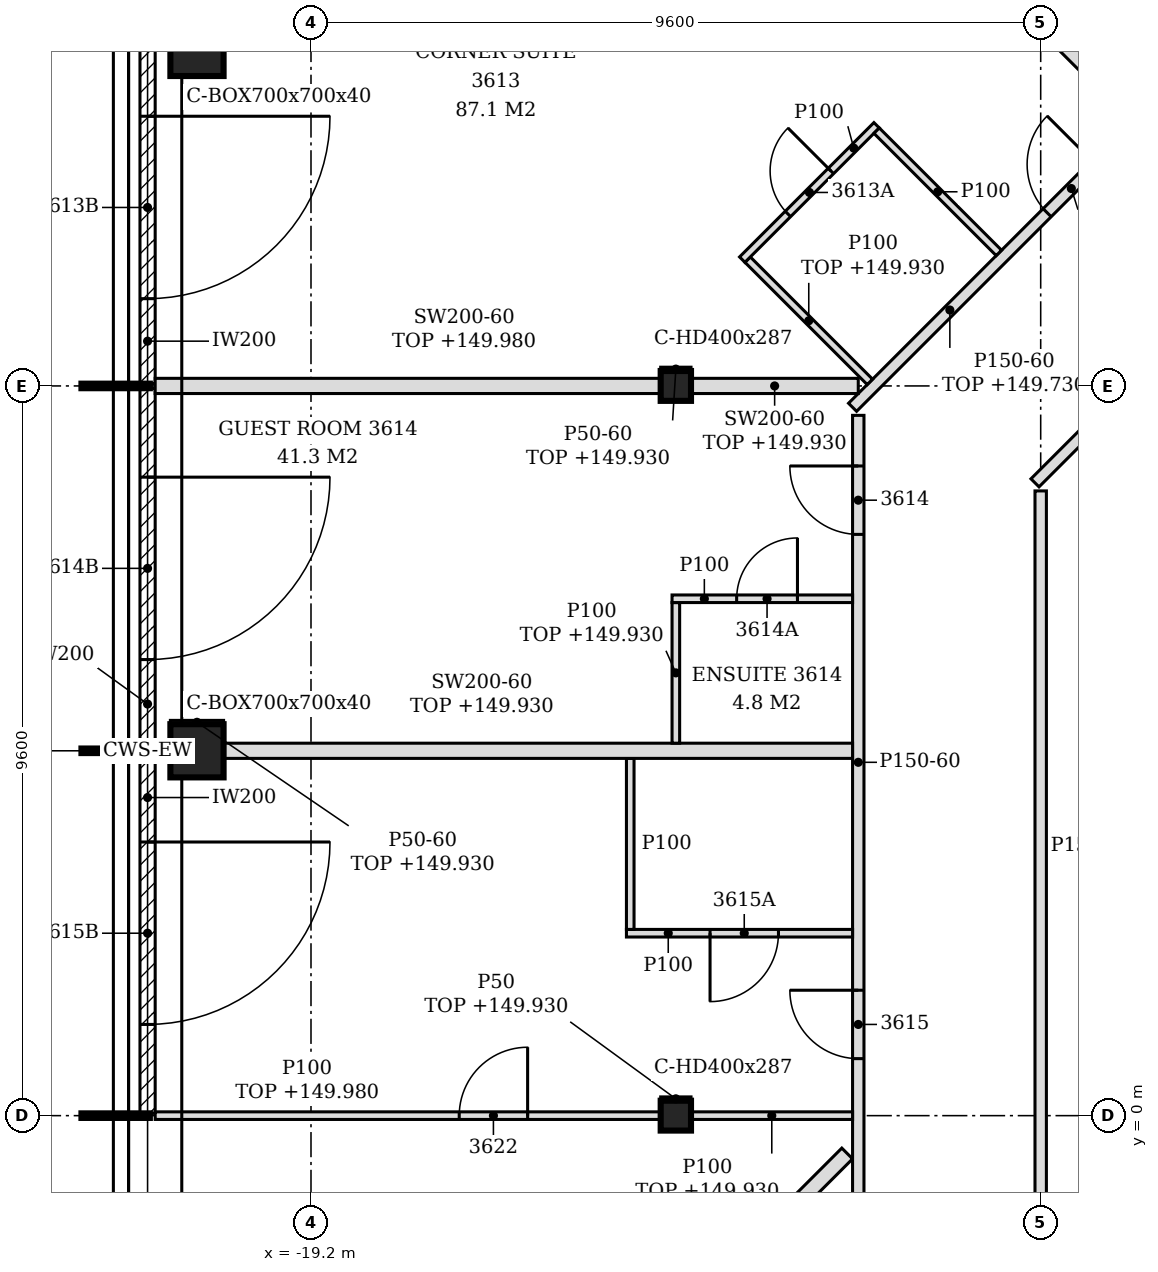
"""IFC4 building model, lengths in metres.
Left out: names, types, materials, properties, quantities, classifications, styles, units other than length and angle.
Written with IfcOpenShell. Run it as: python <this file> out.ifc"""

import sys

from ifc_helpers import new_model, si_unit, direction, frame, frame_2d, origin, origin_2d, place, context, subcontext, project, spatial, polyline, rectangle, hollow_rectangle, i_section, outline, extrude, element, fill, save


model = new_model("IFC4")
c1 = context("Model", 3, precision=1e-05, world=origin(), true_north=direction((0.0, 1.0)))
c2 = subcontext(c1, "Body", "Model", "MODEL_VIEW")
j1 = project(units=[si_unit("LENGTHUNIT", "METRE"), si_unit("PLANEANGLEUNIT", "RADIAN")], contexts=[c1])
p1 = place(None, origin())
s1 = spatial("IfcSite", under=j1, at=p1, CompositionType="ELEMENT")
p2 = place(p1, origin())
s2 = spatial("IfcBuilding", under=s1, at=p2, CompositionType="ELEMENT")
p3 = place(p2, frame((0.0, 0.0, 147.0)))
s3 = spatial("IfcBuildingStorey", under=s2, at=p3, CompositionType="ELEMENT", Elevation=147.0)
for number, where, z_axis, x_axis in (
    (1, (-20.7, 14.027, -0.15), (0.0, 0.0, 1.0), (1.0, 0.0, 0.0)),
    (2, (-20.7, 4.8, -0.15), (0.0, 0.0, 1.0), (1.0, 0.0, 0.0)),
):
    element("IfcColumn", number, at=place(p3, frame(where, z_axis=z_axis, x_axis=x_axis)), inside=s3, PredefinedType="COLUMN", context=c2, shape_type="SweptSolid", body=[
        extrude(hollow_rectangle(XDim=0.7, YDim=0.7, WallThickness=0.04, at=origin_2d()), origin(), (0.0, 0.0, 1.0), 3.6),
    ])
for number, where, z_axis, x_axis in (
    (3, (-14.4, 0.0, -0.15), (0.0, 0.0, 1.0), (1.0, 0.0, 0.0)),
    (4, (-14.4, 9.6, -0.15), (0.0, 0.0, 1.0), (1.0, 0.0, 0.0)),
):
    element("IfcColumn", number, at=place(p3, frame(where, z_axis=z_axis, x_axis=x_axis)), inside=s3, PredefinedType="COLUMN", context=c2, shape_type="SweptSolid", body=[
        extrude(i_section(OverallWidth=0.399, OverallDepth=0.393, WebThickness=0.023, FlangeThickness=0.037, FilletRadius=0.015, at=origin_2d()), origin(), (0.0, 0.0, 1.0), 3.6),
    ])
p4 = place(p3, frame((-21.35, 14.256, 0.0), z_axis=(0.0, 0.0, 1.0), x_axis=(0.0, -1.0, 0.0)))
e5 = element("IfcWall", 5, at=p4, inside=s3, PredefinedType="NOTDEFINED", context=c2, shape_type="SweptSolid", body=[
    extrude(rectangle(XDim=4.626, YDim=0.2, at=frame_2d((2.313, 0.0))), origin(), (0.0, 0.0, 1.0), 3.45),
])
p5 = place(p4, frame((1.108, 0.0, 0.0)))
e6 = element("IfcOpeningElement", 6, at=p5, cuts=e5, PredefinedType="OPENING", context=c2, shape_type="SweptSolid", body=[
    extrude(rectangle(XDim=2.4, YDim=2.4, at=frame_2d((1.2, 1.2))), frame((0.0, 0.11, 0.0), z_axis=(0.0, -1.0, 0.0), x_axis=(1.0, 0.0, 0.0)), (0.0, 0.0, 1.0), 0.22),
])
p6 = place(p3, frame((-21.35, 9.57, 0.0), z_axis=(0.0, 0.0, 1.0), x_axis=(0.0, -1.0, 0.0)))
e7 = element("IfcWall", 7, at=p6, inside=s3, PredefinedType="NOTDEFINED", context=c2, shape_type="SweptSolid", body=[
    extrude(rectangle(XDim=4.74, YDim=0.2, at=frame_2d((2.37, 0.0))), origin(), (0.0, 0.0, 1.0), 3.45),
])
p7 = place(p6, frame((1.17, 0.0, 0.0)))
e8 = element("IfcOpeningElement", 8, at=p7, cuts=e7, PredefinedType="OPENING", context=c2, shape_type="SweptSolid", body=[
    extrude(rectangle(XDim=2.4, YDim=2.4, at=frame_2d((1.2, 1.2))), frame((0.0, 0.11, 0.0), z_axis=(0.0, -1.0, 0.0), x_axis=(1.0, 0.0, 0.0)), (0.0, 0.0, 1.0), 0.22),
])
p8 = place(p3, frame((-21.35, 4.77, 0.0), z_axis=(0.0, 0.0, 1.0), x_axis=(0.0, -1.0, 0.0)))
e9 = element("IfcWall", 9, at=p8, inside=s3, PredefinedType="NOTDEFINED", context=c2, shape_type="SweptSolid", body=[
    extrude(rectangle(XDim=4.74, YDim=0.2, at=frame_2d((2.37, 0.0))), origin(), (0.0, 0.0, 1.0), 3.45),
])
p9 = place(p8, frame((1.17, 0.0, 0.0)))
e10 = element("IfcOpeningElement", 10, at=p9, cuts=e9, PredefinedType="OPENING", context=c2, shape_type="SweptSolid", body=[
    extrude(rectangle(XDim=2.4, YDim=2.4, at=frame_2d((1.2, 1.2))), frame((0.0, 0.11, 0.0), z_axis=(0.0, -1.0, 0.0), x_axis=(1.0, 0.0, 0.0)), (0.0, 0.0, 1.0), 0.22),
])
p10 = place(p3, frame((-18.755, -7.107, 0.0), z_axis=(0.0, 0.0, 1.0), x_axis=(0.707106781187, 0.707106781187, 0.0)))
e11 = element("IfcWall", 11, at=p10, inside=s3, PredefinedType="PARTITIONING", context=c2, shape_type="SweptSolid", body=[
    extrude(rectangle(XDim=9.347, YDim=0.2, at=frame_2d((4.674, 0.0))), origin(), (0.0, 0.0, 1.0), 2.93),
])
p11 = place(p3, frame((-12.0, -4.7, 0.0), z_axis=(0.0, 0.0, 1.0), x_axis=(0.0, 1.0, 0.0)))
e12 = element("IfcWall", 12, at=p11, inside=s3, PredefinedType="PARTITIONING", context=c2, shape_type="SweptSolid", body=[
    extrude(outline(polyline([(0.0, 0.0), (13.913, 0.0), (13.913, 3.45), (9.6, 3.45), (9.598, 2.93), (9.4, 2.93), (9.398, 3.45), (4.8, 3.45), (4.798, 2.93), (4.6, 2.93), (4.598, 3.45), (0.0, 3.45), (0.0, 0.0)])), frame((0.0, 0.075, 0.0), z_axis=(0.0, -1.0, 0.0), x_axis=(1.0, 0.0, 0.0)), (0.0, 0.0, 1.0), 0.15),
])
p12 = place(p11, frame((12.347, 0.0, 0.0)))
e13 = element("IfcOpeningElement", 13, at=p12, cuts=e12, PredefinedType="OPENING", context=c2, shape_type="SweptSolid", body=[
    extrude(rectangle(XDim=0.9, YDim=2.1, at=frame_2d((0.45, 1.05))), frame((0.0, 0.085, 0.0), z_axis=(0.0, -1.0, 0.0), x_axis=(1.0, 0.0, 0.0)), (0.0, 0.0, 1.0), 0.17),
])
p13 = place(p11, frame((5.45, 0.0, 0.0)))
e14 = element("IfcOpeningElement", 14, at=p13, cuts=e12, PredefinedType="OPENING", context=c2, shape_type="SweptSolid", body=[
    extrude(rectangle(XDim=0.9, YDim=2.1, at=frame_2d((0.45, 1.05))), frame((0.0, 0.085, 0.0), z_axis=(0.0, -1.0, 0.0), x_axis=(1.0, 0.0, 0.0)), (0.0, 0.0, 1.0), 0.17),
])
p14 = place(p11, frame((1.777, 0.0, 0.0)))
e15 = element("IfcOpeningElement", 15, at=p14, cuts=e12, PredefinedType="OPENING", context=c2, shape_type="SweptSolid", body=[
    extrude(rectangle(XDim=0.9, YDim=2.1, at=frame_2d((0.45, 1.05))), frame((0.0, 0.085, 0.0), z_axis=(0.0, -1.0, 0.0), x_axis=(1.0, 0.0, 0.0)), (0.0, 0.0, 1.0), 0.17),
])
p15 = place(p3, frame((-9.6, -1.125, 0.0), z_axis=(0.0, 0.0, 1.0), x_axis=(0.0, 1.0, 0.0)))
e16 = element("IfcWall", 16, at=p15, inside=s3, PredefinedType="PARTITIONING", context=c2, shape_type="SweptSolid", body=[
    extrude(outline(polyline([(0.0, 0.0), (9.344, 0.0), (9.344, 3.45), (6.025, 3.45), (6.023, 2.93), (5.825, 2.93), (5.823, 3.45), (1.225, 3.45), (1.223, 2.93), (1.025, 2.93), (1.023, 3.45), (0.0, 3.45), (0.0, 0.0)])), frame((0.0, 0.075, 0.0), z_axis=(0.0, -1.0, 0.0), x_axis=(1.0, 0.0, 0.0)), (0.0, 0.0, 1.0), 0.15),
])
p16 = place(p3, frame((-21.25, 0.0, 0.0), z_axis=(0.0, 0.0, 1.0), x_axis=(1.0, 0.0, 0.0)))
e17 = element("IfcWall", 17, at=p16, inside=s3, PredefinedType="PARTITIONING", context=c2, shape_type="SweptSolid", body=[
    extrude(outline(polyline([(0.0, 0.0), (6.65, 0.0), (6.65, 2.98), (0.7, 2.98), (0.698, 2.93), (0.4, 2.93), (0.398, 2.98), (0.0, 2.98), (0.0, 0.0)])), frame((0.0, 0.05, 0.0), z_axis=(0.0, -1.0, 0.0), x_axis=(1.0, 0.0, 0.0)), (0.0, 0.0, 1.0), 0.1),
])
p17 = place(p16, frame((4.0, 0.0, 0.0)))
e18 = element("IfcOpeningElement", 18, at=p17, cuts=e17, PredefinedType="OPENING", context=c2, shape_type="SweptSolid", body=[
    extrude(rectangle(XDim=0.9, YDim=2.1, at=frame_2d((0.45, 1.05))), frame((0.0, 0.06, 0.0), z_axis=(0.0, -1.0, 0.0), x_axis=(1.0, 0.0, 0.0)), (0.0, 0.0, 1.0), 0.12),
])
p18 = place(p3, frame((-14.2, 0.0, 0.0), z_axis=(0.0, 0.0, 1.0), x_axis=(1.0, 0.0, 0.0)))
e19 = element("IfcWall", 19, at=p18, inside=s3, PredefinedType="PARTITIONING", context=c2, shape_type="SweptSolid", body=[
    extrude(rectangle(XDim=2.125, YDim=0.1, at=frame_2d((1.063, 0.0))), origin(), (0.0, 0.0, 1.0), 2.93),
])
p19 = place(p3, frame((-15.05, 2.4, 0.0), z_axis=(0.0, 0.0, 1.0), x_axis=(1.0, 0.0, 0.0)))
e20 = element("IfcWall", 20, at=p19, inside=s3, PredefinedType="PARTITIONING", context=c2, shape_type="SweptSolid", body=[
    extrude(outline(polyline([(0.0, 0.0), (2.975, 0.0), (2.975, 3.45), (0.8, 3.45), (0.798, 2.93), (0.5, 2.93), (0.498, 3.45), (0.0, 3.45), (0.0, 0.0)])), frame((0.0, 0.05, 0.0), z_axis=(0.0, -1.0, 0.0), x_axis=(1.0, 0.0, 0.0)), (0.0, 0.0, 1.0), 0.1),
])
p20 = place(p19, frame((1.1, 0.0, 0.0)))
e21 = element("IfcOpeningElement", 21, at=p20, cuts=e20, PredefinedType="OPENING", context=c2, shape_type="SweptSolid", body=[
    extrude(rectangle(XDim=0.9, YDim=2.1, at=frame_2d((0.45, 1.05))), frame((0.0, 0.06, 0.0), z_axis=(0.0, -1.0, 0.0), x_axis=(1.0, 0.0, 0.0)), (0.0, 0.0, 1.0), 0.12),
])
p21 = place(p3, frame((-15.0, 2.45, 0.0), z_axis=(0.0, 0.0, 1.0), x_axis=(0.0, 1.0, 0.0)))
e22 = element("IfcWall", 22, at=p21, inside=s3, PredefinedType="PARTITIONING", context=c2, shape_type="SweptSolid", body=[
    extrude(rectangle(XDim=2.25, YDim=0.1, at=frame_2d((1.125, 0.0))), origin(), (0.0, 0.0, 1.0), 3.45),
])
p22 = place(p3, frame((-21.25, 4.8, 0.0), z_axis=(0.0, 0.0, 1.0), x_axis=(1.0, 0.0, 0.0)))
e23 = element("IfcWall", 23, at=p22, inside=s3, PredefinedType="PARTITIONING", context=c2, shape_type="SweptSolid", body=[
    extrude(rectangle(XDim=0.2, YDim=0.2, at=frame_2d((0.1, 0.0))), origin(), (0.0, 0.0, 1.0), 3.45),
])
p23 = place(p3, frame((-20.35, 4.8, 0.0), z_axis=(0.0, 0.0, 1.0), x_axis=(1.0, 0.0, 0.0)))
e24 = element("IfcWall", 24, at=p23, inside=s3, PredefinedType="PARTITIONING", context=c2, shape_type="SweptSolid", body=[
    extrude(rectangle(XDim=8.275, YDim=0.2, at=frame_2d((4.138, 0.0))), origin(), (0.0, 0.0, 1.0), 2.93),
])
p24 = place(p3, frame((-14.4, 4.9, 0.0), z_axis=(0.0, 0.0, 1.0), x_axis=(0.0, 1.0, 0.0)))
e25 = element("IfcWall", 25, at=p24, inside=s3, PredefinedType="PARTITIONING", context=c2, shape_type="SweptSolid", body=[
    extrude(rectangle(XDim=1.85, YDim=0.1, at=frame_2d((0.925, 0.0))), origin(), (0.0, 0.0, 1.0), 2.93),
])
p25 = place(p3, frame((-14.45, 6.8, 0.0), z_axis=(0.0, 0.0, 1.0), x_axis=(1.0, 0.0, 0.0)))
e26 = element("IfcWall", 26, at=p25, inside=s3, PredefinedType="PARTITIONING", context=c2, shape_type="SweptSolid", body=[
    extrude(outline(polyline([(0.0, 0.0), (2.375, 0.0), (2.375, 3.45), (0.2, 3.45), (0.198, 2.93), (0.0, 2.93), (0.0, 0.0)])), frame((0.0, 0.05, 0.0), z_axis=(0.0, -1.0, 0.0), x_axis=(1.0, 0.0, 0.0)), (0.0, 0.0, 1.0), 0.1),
])
p26 = place(p25, frame((0.85, 0.0, 0.0)))
e27 = element("IfcOpeningElement", 27, at=p26, cuts=e26, PredefinedType="OPENING", context=c2, shape_type="SweptSolid", body=[
    extrude(rectangle(XDim=0.8, YDim=2.1, at=frame_2d((0.4, 1.05))), frame((0.0, 0.06, 0.0), z_axis=(0.0, -1.0, 0.0), x_axis=(1.0, 0.0, 0.0)), (0.0, 0.0, 1.0), 0.12),
])
p27 = place(p3, frame((-9.675, 8.325, 0.0), z_axis=(0.0, 0.0, 1.0), x_axis=(0.707106781187, 0.707106781187, 0.0)))
e28 = element("IfcWall", 28, at=p27, inside=s3, PredefinedType="PARTITIONING", context=c2, shape_type="SweptSolid", body=[
    extrude(rectangle(XDim=6.599, YDim=0.15, at=frame_2d((3.3, 0.0))), origin(), (0.0, 0.0, 1.0), 2.93),
])
p28 = place(p3, frame((-12.075, 9.319, 0.0), z_axis=(0.0, 0.0, 1.0), x_axis=(0.707106781187, 0.707106781187, 0.0)))
e29 = element("IfcWall", 29, at=p28, inside=s3, PredefinedType="PARTITIONING", context=c2, shape_type="SweptSolid", body=[
    extrude(rectangle(XDim=13.793, YDim=0.15, at=frame_2d((6.896, 0.0))), origin(), (0.0, 0.0, 1.0), 2.73),
])
p29 = place(p28, frame((11.692, 0.0, 0.0)))
e30 = element("IfcOpeningElement", 30, at=p29, cuts=e29, PredefinedType="OPENING", context=c2, shape_type="SweptSolid", body=[
    extrude(rectangle(XDim=0.9, YDim=2.1, at=frame_2d((0.45, 1.05))), frame((0.0, 0.085, 0.0), z_axis=(0.0, -1.0, 0.0), x_axis=(1.0, 0.0, 0.0)), (0.0, 0.0, 1.0), 0.17),
])
p30 = place(p28, frame((7.376, 0.0, 0.0)))
e31 = element("IfcOpeningElement", 31, at=p30, cuts=e29, PredefinedType="OPENING", context=c2, shape_type="SweptSolid", body=[
    extrude(rectangle(XDim=0.9, YDim=2.1, at=frame_2d((0.45, 1.05))), frame((0.0, 0.085, 0.0), z_axis=(0.0, -1.0, 0.0), x_axis=(1.0, 0.0, 0.0)), (0.0, 0.0, 1.0), 0.17),
])
p31 = place(p28, frame((3.62, 0.0, 0.0)))
e32 = element("IfcOpeningElement", 32, at=p31, cuts=e29, PredefinedType="OPENING", context=c2, shape_type="SweptSolid", body=[
    extrude(rectangle(XDim=0.9, YDim=2.1, at=frame_2d((0.45, 1.05))), frame((0.0, 0.085, 0.0), z_axis=(0.0, -1.0, 0.0), x_axis=(1.0, 0.0, 0.0)), (0.0, 0.0, 1.0), 0.17),
])
p32 = place(p3, frame((-21.25, 9.6, 0.0), z_axis=(0.0, 0.0, 1.0), x_axis=(1.0, 0.0, 0.0)))
e33 = element("IfcWall", 33, at=p32, inside=s3, PredefinedType="PARTITIONING", context=c2, shape_type="SweptSolid", body=[
    extrude(outline(polyline([(0.0, 0.0), (6.65, 0.0), (6.65, 2.98), (0.7, 2.98), (0.698, 2.93), (0.4, 2.93), (0.398, 2.98), (0.0, 2.98), (0.0, 0.0)])), frame((0.0, 0.1, 0.0), z_axis=(0.0, -1.0, 0.0), x_axis=(1.0, 0.0, 0.0)), (0.0, 0.0, 1.0), 0.2),
])
p33 = place(p3, frame((-14.2, 9.6, 0.0), z_axis=(0.0, 0.0, 1.0), x_axis=(1.0, 0.0, 0.0)))
e34 = element("IfcWall", 34, at=p33, inside=s3, PredefinedType="PARTITIONING", context=c2, shape_type="SweptSolid", body=[
    extrude(rectangle(XDim=2.2, YDim=0.2, at=frame_2d((1.1, 0.0))), origin(), (0.0, 0.0, 1.0), 2.93),
])
p34 = place(p3, frame((-11.847, 9.653, 0.0), z_axis=(0.0, 0.0, 1.0), x_axis=(-0.707106781187, 0.707106781187, 0.0)))
e35 = element("IfcWall", 35, at=p34, inside=s3, PredefinedType="PARTITIONING", context=c2, shape_type="SweptSolid", body=[
    extrude(rectangle(XDim=2.275, YDim=0.1, at=frame_2d((1.137, 0.0))), origin(), (0.0, 0.0, 1.0), 2.93),
])
p35 = place(p3, frame((-13.526, 11.262, 0.0), z_axis=(0.0, 0.0, 1.0), x_axis=(0.707106781187, 0.707106781187, 0.0)))
e36 = element("IfcWall", 36, at=p35, inside=s3, PredefinedType="PARTITIONING", context=c2, shape_type="SweptSolid", body=[
    extrude(rectangle(XDim=2.5, YDim=0.1, at=frame_2d((1.25, 0.0))), origin(), (0.0, 0.0, 1.0), 3.45),
])
p36 = place(p35, frame((0.85, 0.0, 0.0)))
e37 = element("IfcOpeningElement", 37, at=p36, cuts=e36, PredefinedType="OPENING", context=c2, shape_type="SweptSolid", body=[
    extrude(rectangle(XDim=0.8, YDim=2.1, at=frame_2d((0.4, 1.05))), frame((0.0, 0.06, 0.0), z_axis=(0.0, -1.0, 0.0), x_axis=(1.0, 0.0, 0.0)), (0.0, 0.0, 1.0), 0.12),
])
p37 = place(p3, frame((-10.15, 11.35, 0.0), z_axis=(0.0, 0.0, 1.0), x_axis=(-0.707160441348, 0.707053116953, 0.0)))
e38 = element("IfcWall", 38, at=p37, inside=s3, PredefinedType="PARTITIONING", context=c2, shape_type="SweptSolid", body=[
    extrude(rectangle(XDim=2.275, YDim=0.1, at=frame_2d((1.137, 0.0))), origin(), (0.0, 0.0, 1.0), 3.45),
])
p38 = place(p3, frame((-8.35, 13.15, 0.0), z_axis=(0.0, 0.0, 1.0), x_axis=(-0.707092030896, 0.707121531169, 0.0)))
e39 = element("IfcWall", 39, at=p38, inside=s3, PredefinedType="PARTITIONING", context=c2, shape_type="SweptSolid", body=[
    extrude(rectangle(XDim=8.276, YDim=0.2, at=frame_2d((4.138, 0.0))), origin(), (0.0, 0.0, 1.0), 2.93),
])
p39 = place(p3, frame((-14.6, 0.221, 0.0), z_axis=(0.0, 0.0, 1.0), x_axis=(1.0, 0.0, 0.0)))
e40 = element("IfcWall", 40, at=p39, inside=s3, PredefinedType="PARTITIONING", context=c2, shape_type="SweptSolid", body=[
    extrude(rectangle(XDim=0.399, YDim=0.05, at=frame_2d((0.2, 0.0))), origin(), (0.0, 0.0, 1.0), 2.93),
])
p40 = place(p3, frame((-21.05, 5.175, 0.0), z_axis=(0.0, 0.0, 1.0), x_axis=(1.0, 0.0, 0.0)))
e41 = element("IfcWall", 41, at=p40, inside=s3, PredefinedType="PARTITIONING", context=c2, shape_type="SweptSolid", body=[
    extrude(rectangle(XDim=0.7, YDim=0.05, at=frame_2d((0.35, 0.0))), origin(), (0.0, 0.0, 1.0), 2.93),
])
p41 = place(p3, frame((-14.6, 9.822, 0.0), z_axis=(0.0, 0.0, 1.0), x_axis=(1.0, 0.0, 0.0)))
e42 = element("IfcWall", 42, at=p41, inside=s3, PredefinedType="PARTITIONING", context=c2, shape_type="SweptSolid", body=[
    extrude(rectangle(XDim=0.399, YDim=0.05, at=frame_2d((0.2, 0.0))), origin(), (0.0, 0.0, 1.0), 2.93),
])
p42 = place(p5, origin())
e43 = element("IfcDoor", 43, at=p42, inside=s3, OperationType="SINGLE_SWING_LEFT", PredefinedType="DOOR", context=c2, shape_type="SweptSolid", body=[
    extrude(rectangle(XDim=2.4, YDim=2.4, at=frame_2d((1.2, 1.2))), frame((0.0, 0.025, 0.0), z_axis=(0.0, -1.0, 0.0), x_axis=(1.0, 0.0, 0.0)), (0.0, 0.0, 1.0), 0.05),
])
fill(e6, e43)
p43 = place(p7, origin())
e44 = element("IfcDoor", 44, at=p43, inside=s3, OperationType="SINGLE_SWING_LEFT", PredefinedType="DOOR", context=c2, shape_type="SweptSolid", body=[
    extrude(rectangle(XDim=2.4, YDim=2.4, at=frame_2d((1.2, 1.2))), frame((0.0, 0.025, 0.0), z_axis=(0.0, -1.0, 0.0), x_axis=(1.0, 0.0, 0.0)), (0.0, 0.0, 1.0), 0.05),
])
fill(e8, e44)
p44 = place(p9, origin())
e45 = element("IfcDoor", 45, at=p44, inside=s3, OperationType="SINGLE_SWING_LEFT", PredefinedType="DOOR", context=c2, shape_type="SweptSolid", body=[
    extrude(rectangle(XDim=2.4, YDim=2.4, at=frame_2d((1.2, 1.2))), frame((0.0, 0.025, 0.0), z_axis=(0.0, -1.0, 0.0), x_axis=(1.0, 0.0, 0.0)), (0.0, 0.0, 1.0), 0.05),
])
fill(e10, e45)
p45 = place(p31, origin())
e46 = element("IfcDoor", 46, at=p45, inside=s3, OperationType="SINGLE_SWING_RIGHT", PredefinedType="DOOR", context=c2, shape_type="SweptSolid", body=[
    extrude(rectangle(XDim=0.9, YDim=2.1, at=frame_2d((0.45, 1.05))), frame((0.0, 0.025, 0.0), z_axis=(0.0, -1.0, 0.0), x_axis=(1.0, 0.0, 0.0)), (0.0, 0.0, 1.0), 0.05),
])
fill(e32, e46)
p46 = place(p36, origin())
e47 = element("IfcDoor", 47, at=p46, inside=s3, OperationType="SINGLE_SWING_RIGHT", PredefinedType="DOOR", context=c2, shape_type="SweptSolid", body=[
    extrude(rectangle(XDim=0.8, YDim=2.1, at=frame_2d((0.4, 1.05))), frame((0.0, 0.025, 0.0), z_axis=(0.0, -1.0, 0.0), x_axis=(1.0, 0.0, 0.0)), (0.0, 0.0, 1.0), 0.05),
])
fill(e37, e47)
p47 = place(p12, origin())
e48 = element("IfcDoor", 48, at=p47, inside=s3, OperationType="SINGLE_SWING_RIGHT", PredefinedType="DOOR", context=c2, shape_type="SweptSolid", body=[
    extrude(rectangle(XDim=0.9, YDim=2.1, at=frame_2d((0.45, 1.05))), frame((0.0, 0.025, 0.0), z_axis=(0.0, -1.0, 0.0), x_axis=(1.0, 0.0, 0.0)), (0.0, 0.0, 1.0), 0.05),
])
fill(e13, e48)
p48 = place(p26, origin())
e49 = element("IfcDoor", 49, at=p48, inside=s3, OperationType="SINGLE_SWING_RIGHT", PredefinedType="DOOR", context=c2, shape_type="SweptSolid", body=[
    extrude(rectangle(XDim=0.8, YDim=2.1, at=frame_2d((0.4, 1.05))), frame((0.0, 0.025, 0.0), z_axis=(0.0, -1.0, 0.0), x_axis=(1.0, 0.0, 0.0)), (0.0, 0.0, 1.0), 0.05),
])
fill(e27, e49)
p49 = place(p13, origin())
e50 = element("IfcDoor", 50, at=p49, inside=s3, OperationType="SINGLE_SWING_RIGHT", PredefinedType="DOOR", context=c2, shape_type="SweptSolid", body=[
    extrude(rectangle(XDim=0.9, YDim=2.1, at=frame_2d((0.45, 1.05))), frame((0.0, 0.025, 0.0), z_axis=(0.0, -1.0, 0.0), x_axis=(1.0, 0.0, 0.0)), (0.0, 0.0, 1.0), 0.05),
])
fill(e14, e50)
p50 = place(p20, frame((0.9, 0.0, 0.0), z_axis=(0.0, 0.0, 1.0), x_axis=(-1.0, 0.0, 0.0)))
e51 = element("IfcDoor", 51, at=p50, inside=s3, OperationType="SINGLE_SWING_RIGHT", PredefinedType="DOOR", context=c2, shape_type="SweptSolid", body=[
    extrude(rectangle(XDim=0.9, YDim=2.1, at=frame_2d((0.45, 1.05))), frame((0.0, 0.025, 0.0), z_axis=(0.0, -1.0, 0.0), x_axis=(1.0, 0.0, 0.0)), (0.0, 0.0, 1.0), 0.05),
])
fill(e21, e51)
p51 = place(p17, origin())
e52 = element("IfcDoor", 52, at=p51, inside=s3, OperationType="SINGLE_SWING_RIGHT", PredefinedType="DOOR", context=c2, shape_type="SweptSolid", body=[
    extrude(rectangle(XDim=0.9, YDim=2.1, at=frame_2d((0.45, 1.05))), frame((0.0, 0.025, 0.0), z_axis=(0.0, -1.0, 0.0), x_axis=(1.0, 0.0, 0.0)), (0.0, 0.0, 1.0), 0.05),
])
fill(e18, e52)
save(model, sys.argv[1])
